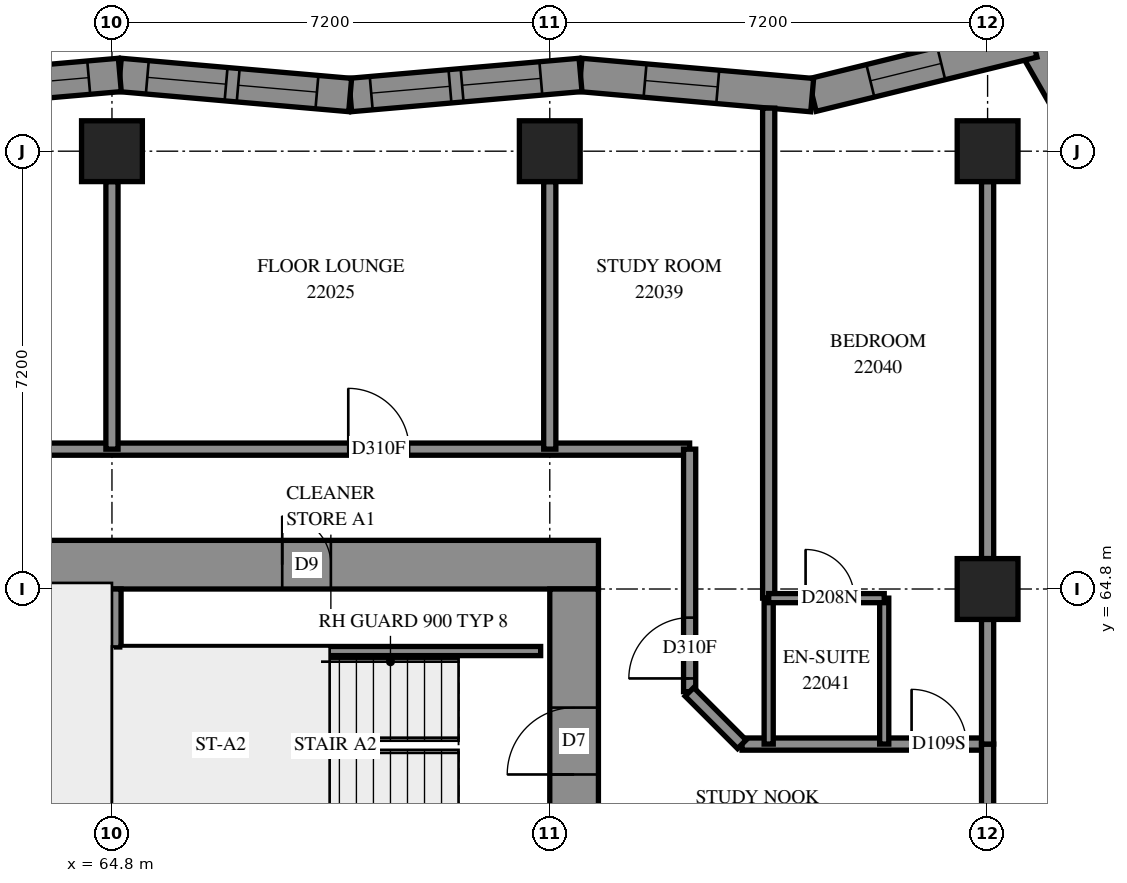
"""IFC4 building model, lengths in metres.
Left out: names, types, materials, properties, quantities, classifications, styles, units other than length and angle.
Written with IfcOpenShell. Run it as: python <this file> out.ifc"""

import sys

from ifc_helpers import new_model, si_unit, direction, frame, frame_2d, origin, origin_2d, place, context, subcontext, project, spatial, polyline, rectangle, outline, extrude, element, fill, save


model = new_model("IFC4")
c1 = context("Model", 3, precision=1e-05, world=origin(), true_north=direction((0.0, 1.0)))
c2 = subcontext(c1, "Body", "Model", "MODEL_VIEW")
j1 = project(units=[si_unit("LENGTHUNIT", "METRE"), si_unit("PLANEANGLEUNIT", "RADIAN")], contexts=[c1])
p1 = place(None, origin())
s1 = spatial("IfcSite", under=j1, at=p1, CompositionType="ELEMENT")
p2 = place(p1, origin())
s2 = spatial("IfcBuilding", under=s1, at=p2, CompositionType="ELEMENT")
p3 = place(p2, frame((0.0, 0.0, 84.6)))
s3 = spatial("IfcBuildingStorey", under=s2, at=p3, CompositionType="ELEMENT", Elevation=84.6)
for number, where, z_axis, x_axis in (
    (1, (64.8, 72.0, 0.0), (0.0, 0.0, 1.0), (1.0, 0.0, 0.0)),
    (2, (72.0, 72.0, 0.0), (0.0, 0.0, 1.0), (1.0, 0.0, 0.0)),
    (3, (79.2, 64.8, 0.0), (0.0, 0.0, 1.0), (1.0, 0.0, 0.0)),
    (4, (79.2, 72.0, 0.0), (0.0, 0.0, 1.0), (1.0, 0.0, 0.0)),
):
    element("IfcColumn", number, at=place(p3, frame(where, z_axis=z_axis, x_axis=x_axis)), inside=s3, PredefinedType="COLUMN", context=c2, shape_type="SweptSolid", body=[
        extrude(rectangle(XDim=1.0, YDim=1.0, at=origin_2d()), origin(), (0.0, 0.0, 1.0), 3.1),
    ])
p4 = place(p3, frame((56.8, 65.2, -0.3), z_axis=(0.0, 0.0, 1.0), x_axis=(1.0, 0.0, 0.0)))
e5 = element("IfcWall", 5, at=p4, inside=s3, PredefinedType="SHEAR", context=c2, shape_type="SweptSolid", body=[
    extrude(rectangle(XDim=16.0, YDim=0.8, at=frame_2d((8.0, 0.0))), origin(), (0.0, 0.0, 1.0), 2.7),
])
p5 = place(p4, frame((10.8, 0.0, 0.3)))
e6 = element("IfcOpeningElement", 6, at=p5, cuts=e5, PredefinedType="OPENING", context=c2, shape_type="SweptSolid", body=[
    extrude(rectangle(XDim=0.8, YDim=2.1, at=frame_2d((0.4, 1.05))), frame((0.0, 0.41, 0.0), z_axis=(0.0, -1.0, 0.0), x_axis=(1.0, 0.0, 0.0)), (0.0, 0.0, 1.0), 0.82),
])
p6 = place(p3, frame((72.4, 50.4, -0.3), z_axis=(0.0, 0.0, 1.0), x_axis=(0.0, 1.0, 0.0)))
e7 = element("IfcWall", 7, at=p6, inside=s3, PredefinedType="SHEAR", context=c2, shape_type="SweptSolid", body=[
    extrude(rectangle(XDim=14.4, YDim=0.8, at=frame_2d((7.2, 0.0))), origin(), (0.0, 0.0, 1.0), 2.7),
])
p7 = place(p6, frame((4.55, 0.0, 0.3)))
e8 = element("IfcOpeningElement", 8, at=p7, cuts=e7, PredefinedType="OPENING", context=c2, shape_type="SweptSolid", body=[
    extrude(rectangle(XDim=1.1, YDim=2.1, at=frame_2d((0.55, 1.05))), frame((0.0, 0.41, 0.0), z_axis=(0.0, -1.0, 0.0), x_axis=(1.0, 0.0, 0.0)), (0.0, 0.0, 1.0), 0.82),
])
p8 = place(p6, frame((11.35, 0.0, 0.3)))
e9 = element("IfcOpeningElement", 9, at=p8, cuts=e7, PredefinedType="OPENING", context=c2, shape_type="SweptSolid", body=[
    extrude(rectangle(XDim=1.1, YDim=2.1, at=frame_2d((0.55, 1.05))), frame((0.0, 0.41, 0.0), z_axis=(0.0, -1.0, 0.0), x_axis=(1.0, 0.0, 0.0)), (0.0, 0.0, 1.0), 0.82),
])
p9 = place(p3, frame((64.8, 60.6, 0.0), z_axis=(0.0, 0.0, 1.0), x_axis=(0.0, 1.0, 0.0)))
e10 = element("IfcWall", 10, at=p9, inside=s3, PredefinedType="SOLIDWALL", context=c2, shape_type="SweptSolid", body=[
    extrude(rectangle(XDim=4.2, YDim=0.3, at=frame_2d((2.1, 0.0))), origin(), (0.0, 0.0, 1.0), 3.1),
])
p10 = place(p3, frame((81.619, 70.884, 0.0), z_axis=(0.0, 0.0, 1.0), x_axis=(-0.4958579937, 0.8684036217, 0.0)))
e11 = element("IfcWall", 11, at=p10, inside=s3, PredefinedType="SOLIDWALL", context=c2, shape_type="SweptSolid", body=[
    extrude(outline(polyline([(0.051, -0.275), (3.581, -0.275), (3.166, 0.275), (-0.051, 0.275), (0.051, -0.275)])), origin(), (0.0, 0.0, 1.0), 3.1),
])
p11 = place(p10, frame((0.796, 0.0, 0.5)))
e12 = element("IfcOpeningElement", 12, at=p11, cuts=e11, PredefinedType="OPENING", context=c2, shape_type="SweptSolid", body=[
    extrude(rectangle(XDim=1.2, YDim=2.45, at=frame_2d((0.6, 1.225))), frame((0.0, 0.285, 0.0), z_axis=(0.0, -1.0, 0.0), x_axis=(1.0, 0.0, 0.0)), (0.0, 0.0, 1.0), 0.57),
])
p12 = place(p3, frame((79.946, 73.814, 0.0), z_axis=(0.0, 0.0, 1.0), x_axis=(-0.9711611998, -0.2384238325, 0.0)))
e13 = element("IfcWall", 13, at=p12, inside=s3, PredefinedType="SOLIDWALL", context=c2, shape_type="SweptSolid", body=[
    extrude(outline(polyline([(-0.207, -0.275), (3.693, -0.275), (3.784, 0.275), (0.207, 0.275), (-0.207, -0.275)])), origin(), (0.0, 0.0, 1.0), 3.1),
])
p13 = place(p12, frame((1.554, 0.0, 0.5)))
e14 = element("IfcOpeningElement", 14, at=p13, cuts=e13, PredefinedType="OPENING", context=c2, shape_type="SweptSolid", body=[
    extrude(rectangle(XDim=1.2, YDim=2.45, at=frame_2d((0.6, 1.225))), frame((0.0, 0.285, 0.0), z_axis=(0.0, -1.0, 0.0), x_axis=(1.0, 0.0, 0.0)), (0.0, 0.0, 1.0), 0.57),
])
p14 = place(p3, frame((76.316, 72.922, 0.0), z_axis=(0.0, 0.0, 1.0), x_axis=(-0.9962265436, 0.0867909782, 0.0)))
e15 = element("IfcWall", 15, at=p14, inside=s3, PredefinedType="SOLIDWALL", context=c2, shape_type="SweptSolid", body=[
    extrude(outline(polyline([(0.045, -0.275), (3.848, -0.275), (3.8, 0.275), (-0.045, 0.275), (0.045, -0.275)])), origin(), (0.0, 0.0, 1.0), 3.1),
])
p15 = place(p14, frame((1.559, 0.0, 0.5)))
e16 = element("IfcOpeningElement", 16, at=p15, cuts=e15, PredefinedType="OPENING", context=c2, shape_type="SweptSolid", body=[
    extrude(rectangle(XDim=1.2, YDim=2.45, at=frame_2d((0.6, 1.225))), frame((0.0, 0.285, 0.0), z_axis=(0.0, -1.0, 0.0), x_axis=(1.0, 0.0, 0.0)), (0.0, 0.0, 1.0), 0.57),
])
p16 = place(p3, frame((72.506, 73.254, 0.0), z_axis=(0.0, 0.0, 1.0), x_axis=(-0.9962273538, -0.0867816769, 0.0)))
e17 = element("IfcWall", 17, at=p16, inside=s3, PredefinedType="SOLIDWALL", context=c2, shape_type="SweptSolid", body=[
    extrude(outline(polyline([(-0.024, -0.275), (3.779, -0.275), (3.827, 0.275), (0.024, 0.275), (-0.024, -0.275)])), origin(), (0.0, 0.0, 1.0), 3.1),
])
p17 = place(p16, frame((0.655, 0.0, 0.5)))
e18 = element("IfcOpeningElement", 18, at=p17, cuts=e17, PredefinedType="OPENING", context=c2, shape_type="SweptSolid", body=[
    extrude(rectangle(XDim=1.3, YDim=2.45, at=frame_2d((0.65, 1.225))), frame((0.0, 0.285, 0.0), z_axis=(0.0, -1.0, 0.0), x_axis=(1.0, 0.0, 0.0)), (0.0, 0.0, 1.0), 0.57),
])
p18 = place(p16, frame((2.155, 0.0, 0.5)))
e19 = element("IfcOpeningElement", 19, at=p18, cuts=e17, PredefinedType="OPENING", context=c2, shape_type="SweptSolid", body=[
    extrude(rectangle(XDim=1.3, YDim=2.45, at=frame_2d((0.65, 1.225))), frame((0.0, 0.285, 0.0), z_axis=(0.0, -1.0, 0.0), x_axis=(1.0, 0.0, 0.0)), (0.0, 0.0, 1.0), 0.57),
])
p19 = place(p3, frame((68.718, 72.924, 0.0), z_axis=(0.0, 0.0, 1.0), x_axis=(-0.9962273538, 0.0867816769, 0.0)))
e20 = element("IfcWall", 20, at=p19, inside=s3, PredefinedType="SOLIDWALL", context=c2, shape_type="SweptSolid", body=[
    extrude(outline(polyline([(0.024, -0.275), (3.827, -0.275), (3.779, 0.275), (-0.024, 0.275), (0.024, -0.275)])), origin(), (0.0, 0.0, 1.0), 3.1),
])
p20 = place(p19, frame((0.549, 0.0, 0.5)))
e21 = element("IfcOpeningElement", 21, at=p20, cuts=e20, PredefinedType="OPENING", context=c2, shape_type="SweptSolid", body=[
    extrude(rectangle(XDim=1.3, YDim=2.45, at=frame_2d((0.65, 1.225))), frame((0.0, 0.285, 0.0), z_axis=(0.0, -1.0, 0.0), x_axis=(1.0, 0.0, 0.0)), (0.0, 0.0, 1.0), 0.57),
])
p21 = place(p19, frame((2.049, 0.0, 0.5)))
e22 = element("IfcOpeningElement", 22, at=p21, cuts=e20, PredefinedType="OPENING", context=c2, shape_type="SweptSolid", body=[
    extrude(rectangle(XDim=1.3, YDim=2.45, at=frame_2d((0.65, 1.225))), frame((0.0, 0.285, 0.0), z_axis=(0.0, -1.0, 0.0), x_axis=(1.0, 0.0, 0.0)), (0.0, 0.0, 1.0), 0.57),
])
p22 = place(p3, frame((64.929, 73.254, 0.0), z_axis=(0.0, 0.0, 1.0), x_axis=(-0.9962271558, -0.0867839505, 0.0)))
e23 = element("IfcWall", 23, at=p22, inside=s3, PredefinedType="SOLIDWALL", context=c2, shape_type="SweptSolid", body=[
    extrude(outline(polyline([(-0.024, -0.275), (3.779, -0.275), (3.827, 0.275), (0.024, 0.275), (-0.024, -0.275)])), origin(), (0.0, 0.0, 1.0), 3.1),
])
p23 = place(p22, frame((0.513, 0.0, 0.5)))
e24 = element("IfcOpeningElement", 24, at=p23, cuts=e23, PredefinedType="OPENING", context=c2, shape_type="SweptSolid", body=[
    extrude(rectangle(XDim=1.3, YDim=2.45, at=frame_2d((0.65, 1.225))), frame((0.0, 0.285, 0.0), z_axis=(0.0, -1.0, 0.0), x_axis=(1.0, 0.0, 0.0)), (0.0, 0.0, 1.0), 0.57),
])
p24 = place(p22, frame((2.013, 0.0, 0.5)))
e25 = element("IfcOpeningElement", 25, at=p24, cuts=e23, PredefinedType="OPENING", context=c2, shape_type="SweptSolid", body=[
    extrude(rectangle(XDim=1.3, YDim=2.45, at=frame_2d((0.65, 1.225))), frame((0.0, 0.285, 0.0), z_axis=(0.0, -1.0, 0.0), x_axis=(1.0, 0.0, 0.0)), (0.0, 0.0, 1.0), 0.57),
])
p25 = place(p3, frame((64.95, 63.78, 0.0), z_axis=(0.0, 0.0, 1.0), x_axis=(1.0, 0.0, 0.0)))
e26 = element("IfcWall", 26, at=p25, inside=s3, PredefinedType="PARTITIONING", context=c2, shape_type="SweptSolid", body=[
    extrude(rectangle(XDim=6.9, YDim=0.15, at=frame_2d((3.45, 0.0))), origin(), (0.0, 0.0, 1.0), 3.1),
])
p26 = place(p3, frame((55.3, 67.1, 0.0), z_axis=(0.0, 0.0, 1.0), x_axis=(1.0, 0.0, 0.0)))
e27 = element("IfcWall", 27, at=p26, inside=s3, PredefinedType="PARTITIONING", context=c2, shape_type="SweptSolid", body=[
    extrude(rectangle(XDim=19.0, YDim=0.2, at=frame_2d((9.5, 0.0))), origin(), (0.0, 0.0, 1.0), 3.1),
])
p27 = place(p26, frame((6.161, 0.0, 0.0)))
e28 = element("IfcOpeningElement", 28, at=p27, cuts=e27, PredefinedType="OPENING", context=c2, shape_type="SweptSolid", body=[
    extrude(rectangle(XDim=0.9, YDim=2.1, at=frame_2d((0.45, 1.05))), frame((0.0, 0.11, 0.0), z_axis=(0.0, -1.0, 0.0), x_axis=(1.0, 0.0, 0.0)), (0.0, 0.0, 1.0), 0.22),
])
p28 = place(p26, frame((13.386, 0.0, 0.0)))
e29 = element("IfcOpeningElement", 29, at=p28, cuts=e27, PredefinedType="OPENING", context=c2, shape_type="SweptSolid", body=[
    extrude(rectangle(XDim=1.0, YDim=2.1, at=frame_2d((0.5, 1.05))), frame((0.0, 0.11, 0.0), z_axis=(0.0, -1.0, 0.0), x_axis=(1.0, 0.0, 0.0)), (0.0, 0.0, 1.0), 0.22),
])
p29 = place(p3, frame((75.6, 64.65, 0.0), z_axis=(0.0, 0.0, 1.0), x_axis=(0.0, 1.0, 0.0)))
e30 = element("IfcWall", 30, at=p29, inside=s3, PredefinedType="PARTITIONING", context=c2, shape_type="SweptSolid", body=[
    extrude(rectangle(XDim=8.058, YDim=0.2, at=frame_2d((4.029, 0.0))), origin(), (0.0, 0.0, 1.0), 3.1),
])
p30 = place(p3, frame((79.2, 65.3, 0.0), z_axis=(0.0, 0.0, 1.0), x_axis=(0.0, 1.0, 0.0)))
e31 = element("IfcWall", 31, at=p30, inside=s3, PredefinedType="PARTITIONING", context=c2, shape_type="SweptSolid", body=[
    extrude(rectangle(XDim=6.2, YDim=0.2, at=frame_2d((3.1, 0.0))), origin(), (0.0, 0.0, 1.0), 3.1),
])
for number, where, z_axis, x_axis in (
    (32, (64.8, 67.1, 0.0), (0.0, 0.0, 1.0), (0.0, 1.0, 0.0)),
    (33, (72.0, 67.1, 0.0), (0.0, 0.0, 1.0), (0.0, 1.0, 0.0)),
):
    element("IfcWall", number, at=place(p3, frame(where, z_axis=z_axis, x_axis=x_axis)), inside=s3, PredefinedType="PARTITIONING", context=c2, shape_type="SweptSolid", body=[
        extrude(rectangle(XDim=4.4, YDim=0.2, at=frame_2d((2.2, 0.0))), origin(), (0.0, 0.0, 1.0), 3.1),
    ])
p31 = place(p3, frame((75.162, 62.25, 0.0), z_axis=(0.0, 0.0, 1.0), x_axis=(1.0, 0.0, 0.0)))
e34 = element("IfcWall", 34, at=p31, inside=s3, PredefinedType="PARTITIONING", context=c2, shape_type="SweptSolid", body=[
    extrude(rectangle(XDim=4.038, YDim=0.2, at=frame_2d((2.019, 0.0))), origin(), (0.0, 0.0, 1.0), 3.1),
])
p32 = place(p31, frame((2.788, 0.0, 0.0)))
e35 = element("IfcOpeningElement", 35, at=p32, cuts=e34, PredefinedType="OPENING", context=c2, shape_type="SweptSolid", body=[
    extrude(rectangle(XDim=0.9, YDim=2.1, at=frame_2d((0.45, 1.05))), frame((0.0, 0.11, 0.0), z_axis=(0.0, -1.0, 0.0), x_axis=(1.0, 0.0, 0.0)), (0.0, 0.0, 1.0), 0.22),
])
p33 = place(p3, frame((74.3, 63.112, 0.0), z_axis=(0.0, 0.0, 1.0), x_axis=(0.0, 1.0, 0.0)))
e36 = element("IfcWall", 36, at=p33, inside=s3, PredefinedType="PARTITIONING", context=c2, shape_type="SweptSolid", body=[
    extrude(rectangle(XDim=3.988, YDim=0.2, at=frame_2d((1.994, 0.0))), origin(), (0.0, 0.0, 1.0), 3.1),
])
p34 = place(p33, frame((0.217, 0.0, 0.0)))
e37 = element("IfcOpeningElement", 37, at=p34, cuts=e36, PredefinedType="OPENING", context=c2, shape_type="SweptSolid", body=[
    extrude(rectangle(XDim=1.0, YDim=2.1, at=frame_2d((0.5, 1.05))), frame((0.0, 0.11, 0.0), z_axis=(0.0, -1.0, 0.0), x_axis=(1.0, 0.0, 0.0)), (0.0, 0.0, 1.0), 0.22),
])
for number, where, z_axis, x_axis in (
    (38, (75.6, 62.25, 0.0), (0.0, 0.0, 1.0), (0.0, 1.0, 0.0)),
    (39, (77.5, 62.25, 0.0), (0.0, 0.0, 1.0), (0.0, 1.0, 0.0)),
):
    element("IfcWall", number, at=place(p3, frame(where, z_axis=z_axis, x_axis=x_axis)), inside=s3, PredefinedType="PARTITIONING", context=c2, shape_type="SweptSolid", body=[
        extrude(rectangle(XDim=2.4, YDim=0.15, at=frame_2d((1.2, 0.0))), origin(), (0.0, 0.0, 1.0), 3.1),
    ])
p35 = place(p3, frame((79.2, 60.15, 0.0), z_axis=(0.0, 0.0, 1.0), x_axis=(0.0, 1.0, 0.0)))
e40 = element("IfcWall", 40, at=p35, inside=s3, PredefinedType="PARTITIONING", context=c2, shape_type="SweptSolid", body=[
    extrude(rectangle(XDim=2.1, YDim=0.2, at=frame_2d((1.05, 0.0))), origin(), (0.0, 0.0, 1.0), 3.1),
])
p36 = place(p3, frame((79.2, 62.25, 0.0), z_axis=(0.0, 0.0, 1.0), x_axis=(0.0, 1.0, 0.0)))
e41 = element("IfcWall", 41, at=p36, inside=s3, PredefinedType="PARTITIONING", context=c2, shape_type="SweptSolid", body=[
    extrude(rectangle(XDim=2.05, YDim=0.2, at=frame_2d((1.025, 0.0))), origin(), (0.0, 0.0, 1.0), 3.1),
])
p37 = place(p3, frame((75.6, 64.65, 0.0), z_axis=(0.0, 0.0, 1.0), x_axis=(1.0, 0.0, 0.0)))
e42 = element("IfcWall", 42, at=p37, inside=s3, PredefinedType="PARTITIONING", context=c2, shape_type="SweptSolid", body=[
    extrude(rectangle(XDim=1.9, YDim=0.15, at=frame_2d((0.95, 0.0))), origin(), (0.0, 0.0, 1.0), 3.1),
])
p38 = place(p37, frame((0.607, 0.0, 0.0)))
e43 = element("IfcOpeningElement", 43, at=p38, cuts=e42, PredefinedType="OPENING", context=c2, shape_type="SweptSolid", body=[
    extrude(rectangle(XDim=0.8, YDim=2.1, at=frame_2d((0.4, 1.05))), frame((0.0, 0.085, 0.0), z_axis=(0.0, -1.0, 0.0), x_axis=(1.0, 0.0, 0.0)), (0.0, 0.0, 1.0), 0.17),
])
p39 = place(p3, frame((74.296, 63.108, 0.0), z_axis=(0.0, 0.0, 1.0), x_axis=(0.7071067812, -0.7071067812, 0.0)))
e44 = element("IfcWall", 44, at=p39, inside=s3, PredefinedType="PARTITIONING", context=c2, shape_type="SweptSolid", body=[
    extrude(rectangle(XDim=1.219, YDim=0.2, at=frame_2d((0.61, 0.0))), origin(), (0.0, 0.0, 1.0), 3.1),
])
p40 = place(p13, origin())
e45 = element("IfcWindow", 45, at=p40, inside=s3, PartitioningType="SINGLE_PANEL", PredefinedType="WINDOW", context=c2, shape_type="SweptSolid", body=[
    extrude(rectangle(XDim=1.2, YDim=2.45, at=frame_2d((0.6, 1.225))), frame((0.0, 0.155, 0.0), z_axis=(0.0, -1.0, 0.0), x_axis=(1.0, 0.0, 0.0)), (0.0, 0.0, 1.0), 0.06),
])
fill(e14, e45)
p41 = place(p15, origin())
e46 = element("IfcWindow", 46, at=p41, inside=s3, PartitioningType="SINGLE_PANEL", PredefinedType="WINDOW", context=c2, shape_type="SweptSolid", body=[
    extrude(rectangle(XDim=1.2, YDim=2.45, at=frame_2d((0.6, 1.225))), frame((0.0, 0.155, 0.0), z_axis=(0.0, -1.0, 0.0), x_axis=(1.0, 0.0, 0.0)), (0.0, 0.0, 1.0), 0.06),
])
fill(e16, e46)
p42 = place(p17, origin())
e47 = element("IfcWindow", 47, at=p42, inside=s3, PartitioningType="SINGLE_PANEL", PredefinedType="WINDOW", context=c2, shape_type="SweptSolid", body=[
    extrude(rectangle(XDim=1.3, YDim=2.45, at=frame_2d((0.65, 1.225))), frame((0.0, 0.155, 0.0), z_axis=(0.0, -1.0, 0.0), x_axis=(1.0, 0.0, 0.0)), (0.0, 0.0, 1.0), 0.06),
])
fill(e18, e47)
p43 = place(p18, origin())
e48 = element("IfcWindow", 48, at=p43, inside=s3, PartitioningType="SINGLE_PANEL", PredefinedType="WINDOW", context=c2, shape_type="SweptSolid", body=[
    extrude(rectangle(XDim=1.3, YDim=2.45, at=frame_2d((0.65, 1.225))), frame((0.0, 0.155, 0.0), z_axis=(0.0, -1.0, 0.0), x_axis=(1.0, 0.0, 0.0)), (0.0, 0.0, 1.0), 0.06),
])
fill(e19, e48)
p44 = place(p20, origin())
e49 = element("IfcWindow", 49, at=p44, inside=s3, PartitioningType="SINGLE_PANEL", PredefinedType="WINDOW", context=c2, shape_type="SweptSolid", body=[
    extrude(rectangle(XDim=1.3, YDim=2.45, at=frame_2d((0.65, 1.225))), frame((0.0, 0.155, 0.0), z_axis=(0.0, -1.0, 0.0), x_axis=(1.0, 0.0, 0.0)), (0.0, 0.0, 1.0), 0.06),
])
fill(e21, e49)
p45 = place(p21, origin())
e50 = element("IfcWindow", 50, at=p45, inside=s3, PartitioningType="SINGLE_PANEL", PredefinedType="WINDOW", context=c2, shape_type="SweptSolid", body=[
    extrude(rectangle(XDim=1.3, YDim=2.45, at=frame_2d((0.65, 1.225))), frame((0.0, 0.155, 0.0), z_axis=(0.0, -1.0, 0.0), x_axis=(1.0, 0.0, 0.0)), (0.0, 0.0, 1.0), 0.06),
])
fill(e22, e50)
p46 = place(p23, origin())
e51 = element("IfcWindow", 51, at=p46, inside=s3, PartitioningType="SINGLE_PANEL", PredefinedType="WINDOW", context=c2, shape_type="SweptSolid", body=[
    extrude(rectangle(XDim=1.3, YDim=2.45, at=frame_2d((0.65, 1.225))), frame((0.0, 0.155, 0.0), z_axis=(0.0, -1.0, 0.0), x_axis=(1.0, 0.0, 0.0)), (0.0, 0.0, 1.0), 0.06),
])
fill(e24, e51)
p47 = place(p5, origin())
e52 = element("IfcDoor", 52, at=p47, inside=s3, OperationType="SINGLE_SWING_RIGHT", PredefinedType="DOOR", context=c2, shape_type="SweptSolid", body=[
    extrude(rectangle(XDim=0.8, YDim=2.1, at=frame_2d((0.4, 1.05))), frame((0.0, -0.34, 0.0), z_axis=(0.0, -1.0, 0.0), x_axis=(1.0, 0.0, 0.0)), (0.0, 0.0, 1.0), 0.05),
])
fill(e6, e52)
p48 = place(p8, origin())
e53 = element("IfcDoor", 53, at=p48, inside=s3, OperationType="SINGLE_SWING_RIGHT", PredefinedType="DOOR", context=c2, shape_type="SweptSolid", body=[
    extrude(rectangle(XDim=1.1, YDim=2.1, at=frame_2d((0.55, 1.05))), frame((0.0, 0.025, 0.0), z_axis=(0.0, -1.0, 0.0), x_axis=(1.0, 0.0, 0.0)), (0.0, 0.0, 1.0), 0.05),
])
fill(e9, e53)
p49 = place(p28, origin())
e54 = element("IfcDoor", 54, at=p49, inside=s3, OperationType="SINGLE_SWING_RIGHT", PredefinedType="DOOR", context=c2, shape_type="SweptSolid", body=[
    extrude(rectangle(XDim=1.0, YDim=2.1, at=frame_2d((0.5, 1.05))), frame((0.0, 0.025, 0.0), z_axis=(0.0, -1.0, 0.0), x_axis=(1.0, 0.0, 0.0)), (0.0, 0.0, 1.0), 0.05),
])
fill(e29, e54)
p50 = place(p34, origin())
e55 = element("IfcDoor", 55, at=p50, inside=s3, OperationType="SINGLE_SWING_RIGHT", PredefinedType="DOOR", context=c2, shape_type="SweptSolid", body=[
    extrude(rectangle(XDim=1.0, YDim=2.1, at=frame_2d((0.5, 1.05))), frame((0.0, 0.025, 0.0), z_axis=(0.0, -1.0, 0.0), x_axis=(1.0, 0.0, 0.0)), (0.0, 0.0, 1.0), 0.05),
])
fill(e37, e55)
p51 = place(p32, origin())
e56 = element("IfcDoor", 56, at=p51, inside=s3, OperationType="SINGLE_SWING_LEFT", PredefinedType="DOOR", context=c2, shape_type="SweptSolid", body=[
    extrude(rectangle(XDim=0.9, YDim=2.1, at=frame_2d((0.45, 1.05))), frame((0.0, 0.025, 0.0), z_axis=(0.0, -1.0, 0.0), x_axis=(1.0, 0.0, 0.0)), (0.0, 0.0, 1.0), 0.05),
])
fill(e35, e56)
p52 = place(p38, origin())
e57 = element("IfcDoor", 57, at=p52, inside=s3, OperationType="SINGLE_SWING_RIGHT", PredefinedType="DOOR", context=c2, shape_type="SweptSolid", body=[
    extrude(rectangle(XDim=0.8, YDim=2.1, at=frame_2d((0.4, 1.05))), frame((0.0, 0.025, 0.0), z_axis=(0.0, -1.0, 0.0), x_axis=(1.0, 0.0, 0.0)), (0.0, 0.0, 1.0), 0.05),
])
fill(e43, e57)
save(model, sys.argv[1])
